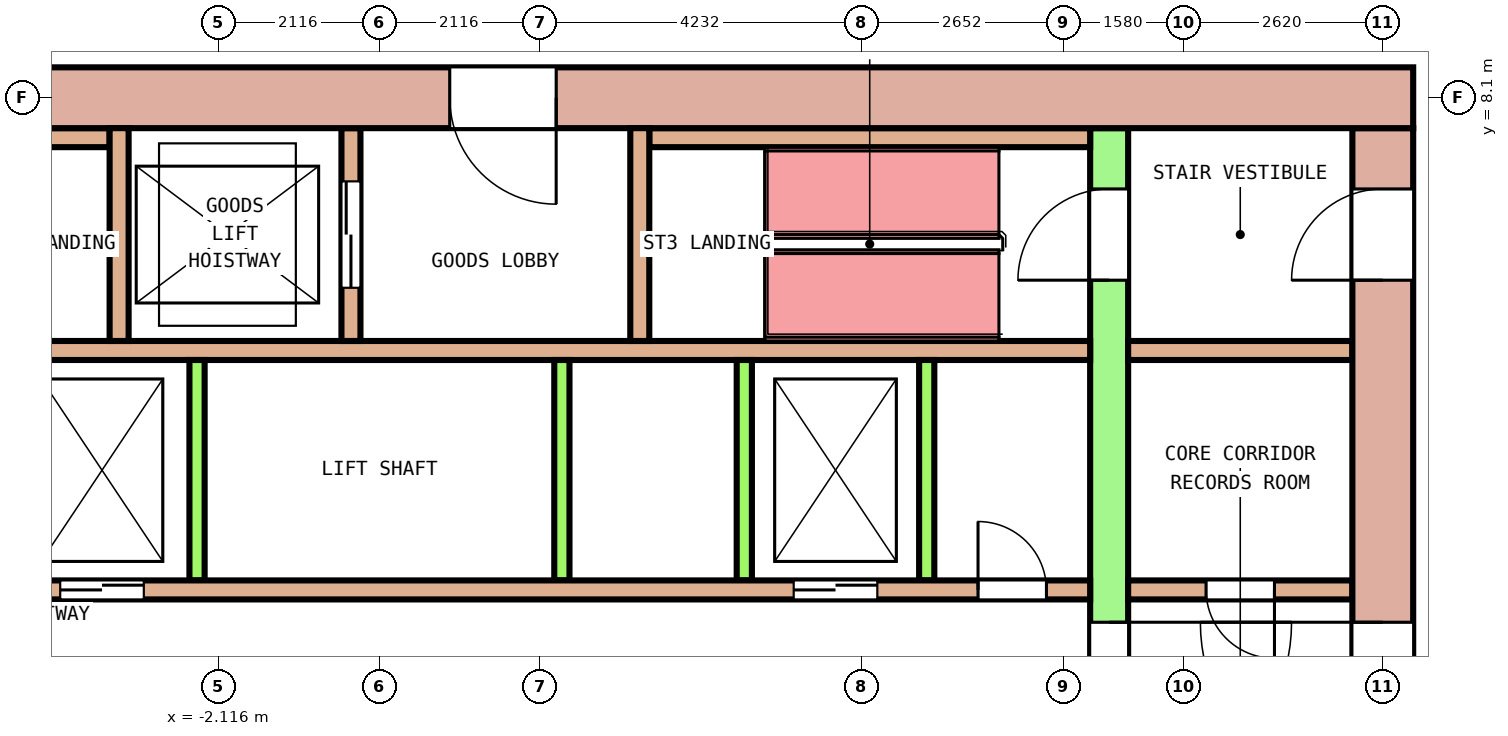
"""IFC4 building model, lengths in metres.
Left out: names, types, materials, properties, quantities, classifications, styles, units other than length and angle.
Written with IfcOpenShell. Run it as: python <this file> out.ifc"""

import sys

from ifc_helpers import new_model, si_unit, direction, frame, frame_2d, origin, place, context, subcontext, project, spatial, rectangle, extrude, element, fill, save


model = new_model("IFC4")
c1 = context("Model", 3, precision=1e-05, world=origin(), true_north=direction((0.0, 1.0)))
c2 = subcontext(c1, "Body", "Model", "MODEL_VIEW")
j1 = project(units=[si_unit("LENGTHUNIT", "METRE"), si_unit("PLANEANGLEUNIT", "RADIAN")], contexts=[c1])
p1 = place(None, origin())
s1 = spatial("IfcSite", under=j1, at=p1, CompositionType="ELEMENT")
p2 = place(p1, origin())
s2 = spatial("IfcBuilding", under=s1, at=p2, CompositionType="ELEMENT")
p3 = place(p2, frame((0.0, 0.0, 130.8)))
s3 = spatial("IfcBuildingStorey", under=s2, at=p3, CompositionType="ELEMENT", Elevation=130.8)
p4 = place(p3, frame((-13.6, 8.1, 0.0), z_axis=(0.0, 0.0, 1.0), x_axis=(1.0, 0.0, 0.0)))
e1 = element("IfcWall", 1, at=p4, inside=s3, PredefinedType="SHEAR", context=c2, shape_type="SweptSolid", body=[
    extrude(rectangle(XDim=27.2, YDim=0.8, at=frame_2d((13.6, 0.0))), origin(), (0.0, 0.0, 1.0), 4.1),
])
p5 = place(p4, frame((14.525, 0.0, 0.0)))
e2 = element("IfcOpeningElement", 2, at=p5, cuts=e1, PredefinedType="OPENING", context=c2, shape_type="SweptSolid", body=[
    extrude(rectangle(XDim=1.4, YDim=2.1, at=frame_2d((0.7, 1.05))), frame((0.0, 0.41, 0.0), z_axis=(0.0, -1.0, 0.0), x_axis=(1.0, 0.0, 0.0)), (0.0, 0.0, 1.0), 0.82),
])
p6 = place(p3, frame((13.2, -7.7, 0.0), z_axis=(0.0, 0.0, 1.0), x_axis=(0.0, 1.0, 0.0)))
e3 = element("IfcWall", 3, at=p6, inside=s3, PredefinedType="SHEAR", context=c2, shape_type="SweptSolid", body=[
    extrude(rectangle(XDim=15.4, YDim=0.8, at=frame_2d((7.7, 0.0))), origin(), (0.0, 0.0, 1.0), 4.1),
])
p7 = place(p6, frame((6.5, 0.0, 0.0)))
e4 = element("IfcOpeningElement", 4, at=p7, cuts=e3, PredefinedType="OPENING", context=c2, shape_type="SweptSolid", body=[
    extrude(rectangle(XDim=2.4, YDim=2.1, at=frame_2d((1.2, 1.05))), frame((0.0, 0.41, 0.0), z_axis=(0.0, -1.0, 0.0), x_axis=(1.0, 0.0, 0.0)), (0.0, 0.0, 1.0), 0.82),
])
p8 = place(p6, frame((13.4, 0.0, 0.0)))
e5 = element("IfcOpeningElement", 5, at=p8, cuts=e3, PredefinedType="OPENING", context=c2, shape_type="SweptSolid", body=[
    extrude(rectangle(XDim=1.2, YDim=2.1, at=frame_2d((0.6, 1.05))), frame((0.0, 0.41, 0.0), z_axis=(0.0, -1.0, 0.0), x_axis=(1.0, 0.0, 0.0)), (0.0, 0.0, 1.0), 0.82),
])
p9 = place(p6, frame((0.9, 0.0, 0.0)))
e6 = element("IfcOpeningElement", 6, at=p9, cuts=e3, PredefinedType="OPENING", context=c2, shape_type="SweptSolid", body=[
    extrude(rectangle(XDim=1.0, YDim=2.1, at=frame_2d((0.5, 1.05))), frame((0.0, 0.41, 0.0), z_axis=(0.0, -1.0, 0.0), x_axis=(1.0, 0.0, 0.0)), (0.0, 0.0, 1.0), 0.82),
])
p10 = place(p3, frame((9.6, -7.7, 0.0), z_axis=(0.0, 0.0, 1.0), x_axis=(0.0, 1.0, 0.0)))
e7 = element("IfcWall", 7, at=p10, inside=s3, PredefinedType="SHEAR", context=c2, shape_type="SweptSolid", body=[
    extrude(rectangle(XDim=15.4, YDim=0.5, at=frame_2d((7.7, 0.0))), origin(), (0.0, 0.0, 1.0), 4.1),
])
p11 = place(p10, frame((6.5, 0.0, 0.0)))
e8 = element("IfcOpeningElement", 8, at=p11, cuts=e7, PredefinedType="OPENING", context=c2, shape_type="SweptSolid", body=[
    extrude(rectangle(XDim=2.4, YDim=2.1, at=frame_2d((1.2, 1.05))), frame((0.0, 0.26, 0.0), z_axis=(0.0, -1.0, 0.0), x_axis=(1.0, 0.0, 0.0)), (0.0, 0.0, 1.0), 0.52),
])
p12 = place(p10, frame((13.4, 0.0, 0.0)))
e9 = element("IfcOpeningElement", 9, at=p12, cuts=e7, PredefinedType="OPENING", context=c2, shape_type="SweptSolid", body=[
    extrude(rectangle(XDim=1.2, YDim=2.1, at=frame_2d((0.6, 1.05))), frame((0.0, 0.26, 0.0), z_axis=(0.0, -1.0, 0.0), x_axis=(1.0, 0.0, 0.0)), (0.0, 0.0, 1.0), 0.52),
])
p13 = place(p10, frame((0.9, 0.0, 0.0)))
e10 = element("IfcOpeningElement", 10, at=p13, cuts=e7, PredefinedType="OPENING", context=c2, shape_type="SweptSolid", body=[
    extrude(rectangle(XDim=1.0, YDim=2.1, at=frame_2d((0.5, 1.05))), frame((0.0, 0.26, 0.0), z_axis=(0.0, -1.0, 0.0), x_axis=(1.0, 0.0, 0.0)), (0.0, 0.0, 1.0), 0.52),
])
p14 = place(p3, frame((-9.35, 1.625, 0.0), z_axis=(0.0, 0.0, 1.0), x_axis=(1.0, 0.0, 0.0)))
e11 = element("IfcWall", 11, at=p14, inside=s3, PredefinedType="SOLIDWALL", context=c2, shape_type="SweptSolid", body=[
    extrude(rectangle(XDim=18.7, YDim=0.25, at=frame_2d((9.35, 0.0))), origin(), (0.0, 0.0, 1.0), 4.1),
])
p15 = place(p14, frame((2.85, 0.0, 0.0)))
e12 = element("IfcOpeningElement", 12, at=p15, cuts=e11, PredefinedType="OPENING", context=c2, shape_type="SweptSolid", body=[
    extrude(rectangle(XDim=1.1, YDim=2.1, at=frame_2d((0.55, 1.05))), frame((0.0, 0.135, 0.0), z_axis=(0.0, -1.0, 0.0), x_axis=(1.0, 0.0, 0.0)), (0.0, 0.0, 1.0), 0.27),
])
p16 = place(p14, frame((5.15, 0.0, 0.0)))
e13 = element("IfcOpeningElement", 13, at=p16, cuts=e11, PredefinedType="OPENING", context=c2, shape_type="SweptSolid", body=[
    extrude(rectangle(XDim=1.1, YDim=2.1, at=frame_2d((0.55, 1.05))), frame((0.0, 0.135, 0.0), z_axis=(0.0, -1.0, 0.0), x_axis=(1.0, 0.0, 0.0)), (0.0, 0.0, 1.0), 0.27),
])
p17 = place(p14, frame((14.8, 0.0, 0.0)))
e14 = element("IfcOpeningElement", 14, at=p17, cuts=e11, PredefinedType="OPENING", context=c2, shape_type="SweptSolid", body=[
    extrude(rectangle(XDim=1.1, YDim=2.1, at=frame_2d((0.55, 1.05))), frame((0.0, 0.135, 0.0), z_axis=(0.0, -1.0, 0.0), x_axis=(1.0, 0.0, 0.0)), (0.0, 0.0, 1.0), 0.27),
])
p18 = place(p14, frame((0.575, 0.0, 0.0)))
e15 = element("IfcOpeningElement", 15, at=p18, cuts=e11, PredefinedType="OPENING", context=c2, shape_type="SweptSolid", body=[
    extrude(rectangle(XDim=0.9, YDim=2.1, at=frame_2d((0.45, 1.05))), frame((0.0, 0.135, 0.0), z_axis=(0.0, -1.0, 0.0), x_axis=(1.0, 0.0, 0.0)), (0.0, 0.0, 1.0), 0.27),
])
p19 = place(p14, frame((17.225, 0.0, 0.0)))
e16 = element("IfcOpeningElement", 16, at=p19, cuts=e11, PredefinedType="OPENING", context=c2, shape_type="SweptSolid", body=[
    extrude(rectangle(XDim=0.9, YDim=2.1, at=frame_2d((0.45, 1.05))), frame((0.0, 0.135, 0.0), z_axis=(0.0, -1.0, 0.0), x_axis=(1.0, 0.0, 0.0)), (0.0, 0.0, 1.0), 0.27),
])
p20 = place(p3, frame((9.85, 1.625, 0.0), z_axis=(0.0, 0.0, 1.0), x_axis=(1.0, 0.0, 0.0)))
e17 = element("IfcWall", 17, at=p20, inside=s3, PredefinedType="SOLIDWALL", context=c2, shape_type="SweptSolid", body=[
    extrude(rectangle(XDim=2.95, YDim=0.25, at=frame_2d((1.475, 0.0))), origin(), (0.0, 0.0, 1.0), 4.1),
])
p21 = place(p20, frame((1.025, 0.0, 0.0)))
e18 = element("IfcOpeningElement", 18, at=p21, cuts=e17, PredefinedType="OPENING", context=c2, shape_type="SweptSolid", body=[
    extrude(rectangle(XDim=0.9, YDim=2.1, at=frame_2d((0.45, 1.05))), frame((0.0, 0.135, 0.0), z_axis=(0.0, -1.0, 0.0), x_axis=(1.0, 0.0, 0.0)), (0.0, 0.0, 1.0), 0.27),
])
p22 = place(p3, frame((-9.35, 4.775, 0.0), z_axis=(0.0, 0.0, 1.0), x_axis=(1.0, 0.0, 0.0)))
e19 = element("IfcWall", 19, at=p22, inside=s3, PredefinedType="SOLIDWALL", context=c2, shape_type="SweptSolid", body=[
    extrude(rectangle(XDim=18.7, YDim=0.25, at=frame_2d((9.35, 0.0))), origin(), (0.0, 0.0, 1.0), 4.1),
])
p23 = place(p3, frame((9.85, 4.775, 0.0), z_axis=(0.0, 0.0, 1.0), x_axis=(1.0, 0.0, 0.0)))
e20 = element("IfcWall", 20, at=p23, inside=s3, PredefinedType="SOLIDWALL", context=c2, shape_type="SweptSolid", body=[
    extrude(rectangle(XDim=2.95, YDim=0.25, at=frame_2d((1.475, 0.0))), origin(), (0.0, 0.0, 1.0), 4.1),
])
for number, where, z_axis, x_axis in (
    (21, (-2.4, 1.75, 0.0), (0.0, 0.0, 1.0), (0.0, 1.0, 0.0)),
    (22, (2.4, 1.75, 0.0), (0.0, 0.0, 1.0), (0.0, 1.0, 0.0)),
    (23, (4.8, 1.75, 0.0), (0.0, 0.0, 1.0), (0.0, 1.0, 0.0)),
    (24, (7.2, 1.75, 0.0), (0.0, 0.0, 1.0), (0.0, 1.0, 0.0)),
):
    element("IfcWall", number, at=place(p3, frame(where, z_axis=z_axis, x_axis=x_axis)), inside=s3, PredefinedType="SOLIDWALL", context=c2, shape_type="SweptSolid", body=[
        extrude(rectangle(XDim=2.9, YDim=0.2, at=frame_2d((1.45, 0.0))), origin(), (0.0, 0.0, 1.0), 4.1),
    ])
for number, where, z_axis, x_axis in (
    (25, (-9.35, 7.575, 0.0), (0.0, 0.0, 1.0), (1.0, 0.0, 0.0)),
    (26, (3.55, 7.575, 0.0), (0.0, 0.0, 1.0), (1.0, 0.0, 0.0)),
):
    element("IfcWall", number, at=place(p3, frame(where, z_axis=z_axis, x_axis=x_axis)), inside=s3, PredefinedType="SOLIDWALL", context=c2, shape_type="SweptSolid", body=[
        extrude(rectangle(XDim=5.8, YDim=0.25, at=frame_2d((2.9, 0.0))), origin(), (0.0, 0.0, 1.0), 4.1),
    ])
p24 = place(p3, frame((-3.425, 4.9, 0.0), z_axis=(0.0, 0.0, 1.0), x_axis=(0.0, 1.0, 0.0)))
e27 = element("IfcWall", 27, at=p24, inside=s3, PredefinedType="SOLIDWALL", context=c2, shape_type="SweptSolid", body=[
    extrude(rectangle(XDim=2.8, YDim=0.25, at=frame_2d((1.4, 0.0))), origin(), (0.0, 0.0, 1.0), 4.1),
])
p25 = place(p3, frame((-0.375, 4.9, 0.0), z_axis=(0.0, 0.0, 1.0), x_axis=(0.0, 1.0, 0.0)))
e28 = element("IfcWall", 28, at=p25, inside=s3, PredefinedType="SOLIDWALL", context=c2, shape_type="SweptSolid", body=[
    extrude(rectangle(XDim=2.8, YDim=0.25, at=frame_2d((1.4, 0.0))), origin(), (0.0, 0.0, 1.0), 4.1),
])
p26 = place(p25, frame((0.7, 0.0, 0.0)))
e29 = element("IfcOpeningElement", 29, at=p26, cuts=e28, PredefinedType="OPENING", context=c2, shape_type="SweptSolid", body=[
    extrude(rectangle(XDim=1.4, YDim=2.1, at=frame_2d((0.7, 1.05))), frame((0.0, 0.135, 0.0), z_axis=(0.0, -1.0, 0.0), x_axis=(1.0, 0.0, 0.0)), (0.0, 0.0, 1.0), 0.27),
])
p27 = place(p3, frame((3.425, 4.9, 0.0), z_axis=(0.0, 0.0, 1.0), x_axis=(0.0, 1.0, 0.0)))
e30 = element("IfcWall", 30, at=p27, inside=s3, PredefinedType="SOLIDWALL", context=c2, shape_type="SweptSolid", body=[
    extrude(rectangle(XDim=2.8, YDim=0.25, at=frame_2d((1.4, 0.0))), origin(), (0.0, 0.0, 1.0), 4.1),
])
p28 = place(p16, origin())
e31 = element("IfcDoor", 31, at=p28, inside=s3, OperationType="DOUBLE_DOOR_SLIDING", PredefinedType="DOOR", context=c2, shape_type="SweptSolid", body=[
    extrude(rectangle(XDim=1.1, YDim=2.1, at=frame_2d((0.55, 1.05))), frame((0.0, 0.075, 0.0), z_axis=(0.0, -1.0, 0.0), x_axis=(1.0, 0.0, 0.0)), (0.0, 0.0, 1.0), 0.15),
])
fill(e13, e31)
p29 = place(p17, origin())
e32 = element("IfcDoor", 32, at=p29, inside=s3, OperationType="DOUBLE_DOOR_SLIDING", PredefinedType="DOOR", context=c2, shape_type="SweptSolid", body=[
    extrude(rectangle(XDim=1.1, YDim=2.1, at=frame_2d((0.55, 1.05))), frame((0.0, 0.075, 0.0), z_axis=(0.0, -1.0, 0.0), x_axis=(1.0, 0.0, 0.0)), (0.0, 0.0, 1.0), 0.15),
])
fill(e14, e32)
p30 = place(p26, origin())
e33 = element("IfcDoor", 33, at=p30, inside=s3, OperationType="DOUBLE_DOOR_SLIDING", PredefinedType="DOOR", context=c2, shape_type="SweptSolid", body=[
    extrude(rectangle(XDim=1.4, YDim=2.1, at=frame_2d((0.7, 1.05))), frame((0.0, 0.075, 0.0), z_axis=(0.0, -1.0, 0.0), x_axis=(1.0, 0.0, 0.0)), (0.0, 0.0, 1.0), 0.15),
])
fill(e29, e33)
p31 = place(p11, origin())
e34 = element("IfcDoor", 34, at=p31, inside=s3, OperationType="DOUBLE_DOOR_SINGLE_SWING", PredefinedType="DOOR", context=c2, shape_type="SweptSolid", body=[
    extrude(rectangle(XDim=2.4, YDim=2.1, at=frame_2d((1.2, 1.05))), frame((0.0, 0.2, 0.0), z_axis=(0.0, -1.0, 0.0), x_axis=(1.0, 0.0, 0.0)), (0.0, 0.0, 1.0), 0.4),
])
fill(e8, e34)
p32 = place(p7, origin())
e35 = element("IfcDoor", 35, at=p32, inside=s3, OperationType="DOUBLE_DOOR_SINGLE_SWING", PredefinedType="DOOR", context=c2, shape_type="SweptSolid", body=[
    extrude(rectangle(XDim=2.4, YDim=2.1, at=frame_2d((1.2, 1.05))), frame((0.0, 0.3, 0.0), z_axis=(0.0, -1.0, 0.0), x_axis=(1.0, 0.0, 0.0)), (0.0, 0.0, 1.0), 0.6),
])
fill(e4, e35)
p33 = place(p12, origin())
e36 = element("IfcDoor", 36, at=p33, inside=s3, OperationType="SINGLE_SWING_RIGHT", PredefinedType="DOOR", context=c2, shape_type="SweptSolid", body=[
    extrude(rectangle(XDim=1.2, YDim=2.1, at=frame_2d((0.6, 1.05))), frame((0.0, 0.2, 0.0), z_axis=(0.0, -1.0, 0.0), x_axis=(1.0, 0.0, 0.0)), (0.0, 0.0, 1.0), 0.4),
])
fill(e9, e36)
p34 = place(p8, origin())
e37 = element("IfcDoor", 37, at=p34, inside=s3, OperationType="SINGLE_SWING_LEFT", PredefinedType="DOOR", context=c2, shape_type="SweptSolid", body=[
    extrude(rectangle(XDim=1.2, YDim=2.1, at=frame_2d((0.6, 1.05))), frame((0.0, 0.3, 0.0), z_axis=(0.0, -1.0, 0.0), x_axis=(1.0, 0.0, 0.0)), (0.0, 0.0, 1.0), 0.6),
])
fill(e5, e37)
p35 = place(p5, origin())
e38 = element("IfcDoor", 38, at=p35, inside=s3, OperationType="DOUBLE_DOOR_SINGLE_SWING", PredefinedType="DOOR", context=c2, shape_type="SweptSolid", body=[
    extrude(rectangle(XDim=1.4, YDim=2.1, at=frame_2d((0.7, 1.05))), frame((0.0, 0.3, 0.0), z_axis=(0.0, -1.0, 0.0), x_axis=(1.0, 0.0, 0.0)), (0.0, 0.0, 1.0), 0.6),
])
fill(e2, e38)
p36 = place(p19, origin())
e39 = element("IfcDoor", 39, at=p36, inside=s3, OperationType="SINGLE_SWING_RIGHT", PredefinedType="DOOR", context=c2, shape_type="SweptSolid", body=[
    extrude(rectangle(XDim=0.9, YDim=2.1, at=frame_2d((0.45, 1.05))), frame((0.0, 0.075, 0.0), z_axis=(0.0, -1.0, 0.0), x_axis=(1.0, 0.0, 0.0)), (0.0, 0.0, 1.0), 0.15),
])
fill(e16, e39)
p37 = place(p21, origin())
e40 = element("IfcDoor", 40, at=p37, inside=s3, OperationType="SINGLE_SWING_LEFT", PredefinedType="DOOR", context=c2, shape_type="SweptSolid", body=[
    extrude(rectangle(XDim=0.9, YDim=2.1, at=frame_2d((0.45, 1.05))), frame((0.0, 0.075, 0.0), z_axis=(0.0, -1.0, 0.0), x_axis=(1.0, 0.0, 0.0)), (0.0, 0.0, 1.0), 0.15),
])
fill(e18, e40)
save(model, sys.argv[1])
